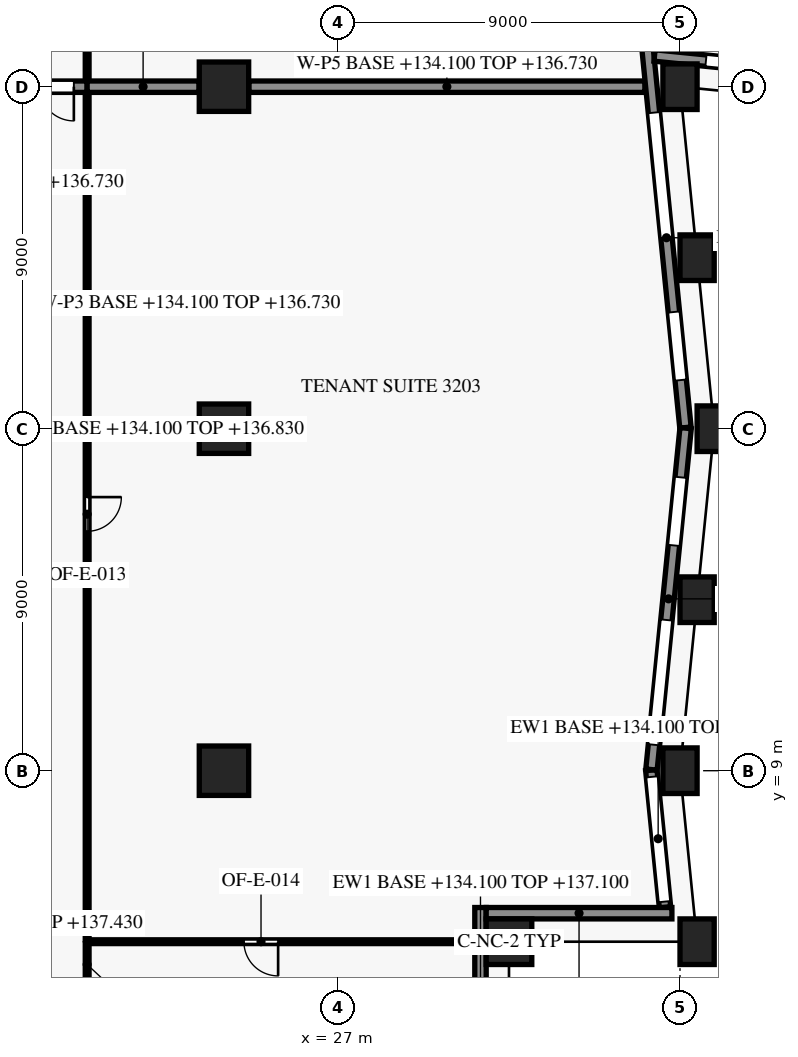
"""IFC4 building model, lengths in metres.
Left out: names, types, materials, properties, quantities, classifications, styles, units other than length and angle.
Written with IfcOpenShell. Run it as: python <this file> out.ifc"""

import sys

from ifc_helpers import new_model, si_unit, direction, frame, frame_2d, origin, origin_2d, place, context, subcontext, project, spatial, rectangle, extrude, element, fill, save


model = new_model("IFC4")
c1 = context("Model", 3, precision=1e-05, world=origin(), true_north=direction((0.0, 1.0)))
c2 = subcontext(c1, "Body", "Model", "MODEL_VIEW")
j1 = project(units=[si_unit("LENGTHUNIT", "METRE"), si_unit("PLANEANGLEUNIT", "RADIAN")], contexts=[c1])
p1 = place(None, origin())
s1 = spatial("IfcSite", under=j1, at=p1, CompositionType="ELEMENT")
p2 = place(p1, origin())
s2 = spatial("IfcBuilding", under=s1, at=p2, CompositionType="ELEMENT")
p3 = place(p2, frame((0.0, 0.0, 134.1)))
s3 = spatial("IfcBuildingStorey", under=s2, at=p3, CompositionType="ELEMENT", Elevation=134.1)
for number, where, z_axis, x_axis in (
    (1, (36.45, 4.5, 0.0), (0.0, 0.0, 1.0), (-0.1, 0.995, 0.0)),
    (2, (36.0, 9.0, 0.0), (0.0, 0.0, 1.0), (0.0, 1.0, 0.0)),
    (3, (36.45, 13.5, 0.0), (0.0, 0.0, 1.0), (0.1, 0.995, 0.0)),
    (4, (36.9, 18.0, 0.0), (0.0, 0.0, 1.0), (0.0, 1.0, 0.0)),
    (5, (36.45, 22.5, 0.0), (0.0, 0.0, 1.0), (-0.1, 0.995, 0.0)),
    (6, (36.0, 27.0, 0.0), (0.0, 0.0, 1.0), (-0.1, 0.995, 0.0)),
):
    element("IfcColumn", number, at=place(p3, frame(where, z_axis=z_axis, x_axis=x_axis)), inside=s3, PredefinedType="COLUMN", context=c2, shape_type="SweptSolid", body=[
        extrude(rectangle(XDim=0.9, YDim=1.2, at=origin_2d()), origin(), (0.0, 0.0, 1.0), 3.8),
    ])
p4 = place(p3, frame((31.5, 4.5, 0.0), z_axis=(0.0, 0.0, 1.0), x_axis=(1.0, 0.0, 0.0)))
e7 = element("IfcColumn", 7, at=p4, inside=s3, PredefinedType="COLUMN", context=c2, shape_type="SweptSolid", body=[
    extrude(rectangle(XDim=1.2, YDim=1.2, at=origin_2d()), origin(), (0.0, 0.0, 1.0), 3.8),
])
for number, where, z_axis, x_axis in (
    (8, (24.0, 9.0, 0.0), (0.0, 0.0, 1.0), (1.0, 0.0, 0.0)),
    (9, (24.0, 18.0, 0.0), (0.0, 0.0, 1.0), (1.0, 0.0, 0.0)),
    (10, (24.0, 27.0, 0.0), (0.0, 0.0, 1.0), (1.0, 0.0, 0.0)),
):
    element("IfcColumn", number, at=place(p3, frame(where, z_axis=z_axis, x_axis=x_axis)), inside=s3, PredefinedType="COLUMN", context=c2, shape_type="SweptSolid", body=[
        extrude(rectangle(XDim=1.3, YDim=1.3, at=origin_2d()), origin(), (0.0, 0.0, 1.0), 3.8),
    ])
p5 = place(p3, frame((30.75, 5.4, 0.0), z_axis=(0.0, 0.0, 1.0), x_axis=(0.0, -1.0, 0.0)))
e11 = element("IfcWall", 11, at=p5, inside=s3, PredefinedType="SOLIDWALL", context=c2, shape_type="SweptSolid", body=[
    extrude(rectangle(XDim=4.502, YDim=0.3, at=frame_2d((2.251, 0.0))), origin(), (0.0, 0.0, 1.0), 3.0),
])
p6 = place(p3, frame((35.787, 5.25, 0.0), z_axis=(0.0, 0.0, 1.0), x_axis=(-1.0, 0.0, 0.0)))
e12 = element("IfcWall", 12, at=p6, inside=s3, PredefinedType="SOLIDWALL", context=c2, shape_type="SweptSolid", body=[
    extrude(rectangle(XDim=4.887, YDim=0.3, at=frame_2d((2.444, 0.0))), origin(), (0.0, 0.0, 1.0), 3.0),
])
p7 = place(p3, frame((35.245, 9.015, 0.0), z_axis=(0.0, 0.0, 1.0), x_axis=(0.099470401798, -0.995040521369, 0.0)))
e13 = element("IfcWall", 13, at=p7, inside=s3, PredefinedType="SOLIDWALL", context=c2, shape_type="SweptSolid", body=[
    extrude(rectangle(XDim=3.628, YDim=0.3, at=frame_2d((1.814, 0.0))), origin(), (0.0, 0.0, 1.0), 3.0),
])
p8 = place(p7, frame((0.178, 0.0, 0.15)))
e14 = element("IfcOpeningElement", 14, at=p8, cuts=e13, PredefinedType="OPENING", context=c2, shape_type="SweptSolid", body=[
    extrude(rectangle(XDim=3.3, YDim=2.4, at=frame_2d((1.65, 1.2))), frame((0.0, 0.16, 0.0), z_axis=(0.0, -1.0, 0.0), x_axis=(1.0, 0.0, 0.0)), (0.0, 0.0, 1.0), 0.32),
])
p9 = place(p3, frame((36.148, 18.015, 0.0), z_axis=(0.0, 0.0, 1.0), x_axis=(-0.099495688264, -0.995037993253, 0.0)))
e15 = element("IfcWall", 15, at=p9, inside=s3, PredefinedType="SOLIDWALL", context=c2, shape_type="SweptSolid", body=[
    extrude(rectangle(XDim=9.03, YDim=0.3, at=frame_2d((4.515, 0.0))), origin(), (0.0, 0.0, 1.0), 3.0),
])
p10 = place(p9, frame((1.301, 0.0, 0.75)))
e16 = element("IfcOpeningElement", 16, at=p10, cuts=e15, PredefinedType="OPENING", context=c2, shape_type="SweptSolid", body=[
    extrude(rectangle(XDim=1.8, YDim=1.8, at=frame_2d((0.9, 0.9))), frame((0.0, 0.16, 0.0), z_axis=(0.0, -1.0, 0.0), x_axis=(1.0, 0.0, 0.0)), (0.0, 0.0, 1.0), 0.32),
])
p11 = place(p9, frame((5.073, 0.0, 0.15)))
e17 = element("IfcOpeningElement", 17, at=p11, cuts=e15, PredefinedType="OPENING", context=c2, shape_type="SweptSolid", body=[
    extrude(rectangle(XDim=3.3, YDim=2.4, at=frame_2d((1.65, 1.2))), frame((0.0, 0.16, 0.0), z_axis=(0.0, -1.0, 0.0), x_axis=(1.0, 0.0, 0.0)), (0.0, 0.0, 1.0), 0.32),
])
p12 = place(p3, frame((35.144, 28.02, 0.0), z_axis=(0.0, 0.0, 1.0), x_axis=(0.099503719021, -0.99503719021, 0.0)))
e18 = element("IfcWall", 18, at=p12, inside=s3, PredefinedType="SOLIDWALL", context=c2, shape_type="SweptSolid", body=[
    extrude(rectangle(XDim=10.04, YDim=0.3, at=frame_2d((5.02, 0.0))), origin(), (0.0, 0.0, 1.0), 3.0),
])
p13 = place(p12, frame((1.711, 0.0, 0.15)))
e19 = element("IfcOpeningElement", 19, at=p13, cuts=e18, PredefinedType="OPENING", context=c2, shape_type="SweptSolid", body=[
    extrude(rectangle(XDim=3.3, YDim=2.4, at=frame_2d((1.65, 1.2))), frame((0.0, 0.16, 0.0), z_axis=(0.0, -1.0, 0.0), x_axis=(1.0, 0.0, 0.0)), (0.0, 0.0, 1.0), 0.32),
])
p14 = place(p12, frame((6.984, 0.0, 0.75)))
e20 = element("IfcOpeningElement", 20, at=p14, cuts=e18, PredefinedType="OPENING", context=c2, shape_type="SweptSolid", body=[
    extrude(rectangle(XDim=1.8, YDim=1.8, at=frame_2d((0.9, 0.9))), frame((0.0, 0.16, 0.0), z_axis=(0.0, -1.0, 0.0), x_axis=(1.0, 0.0, 0.0)), (0.0, 0.0, 1.0), 0.32),
])
p15 = place(p3, frame((45.015, 26.852, 0.0), z_axis=(0.0, 0.0, 1.0), x_axis=(-0.995037438546, 0.099501235631, 0.0)))
e21 = element("IfcWall", 21, at=p15, inside=s3, PredefinedType="SOLIDWALL", context=c2, shape_type="SweptSolid", body=[
    extrude(rectangle(XDim=9.734, YDim=0.3, at=frame_2d((4.867, 0.0))), origin(), (0.0, 0.0, 1.0), 3.0),
])
p16 = place(p15, frame((1.301, 0.0, 0.75)))
e22 = element("IfcOpeningElement", 22, at=p16, cuts=e21, PredefinedType="OPENING", context=c2, shape_type="SweptSolid", body=[
    extrude(rectangle(XDim=1.8, YDim=1.8, at=frame_2d((0.9, 0.9))), frame((0.0, 0.16, 0.0), z_axis=(0.0, -1.0, 0.0), x_axis=(1.0, 0.0, 0.0)), (0.0, 0.0, 1.0), 0.32),
])
p17 = place(p15, frame((5.073, 0.0, 0.15)))
e23 = element("IfcOpeningElement", 23, at=p17, cuts=e21, PredefinedType="OPENING", context=c2, shape_type="SweptSolid", body=[
    extrude(rectangle(XDim=3.3, YDim=2.4, at=frame_2d((1.65, 1.2))), frame((0.0, 0.16, 0.0), z_axis=(0.0, -1.0, 0.0), x_axis=(1.0, 0.0, 0.0)), (0.0, 0.0, 1.0), 0.32),
])
p18 = place(p3, frame((20.4, 4.45, 0.0), z_axis=(0.0, 0.0, 1.0), x_axis=(0.0, -1.0, 0.0)))
e24 = element("IfcWall", 24, at=p18, inside=s3, PredefinedType="PARTITIONING", context=c2, shape_type="SweptSolid", body=[
    extrude(rectangle(XDim=1.1, YDim=0.1, at=frame_2d((0.55, 0.0))), origin(), (0.0, 0.0, 1.0), 3.33),
])
p19 = place(p3, frame((30.58, 4.5, 0.0), z_axis=(0.0, 0.0, 1.0), x_axis=(-1.0, 0.0, 0.0)))
e25 = element("IfcWall", 25, at=p19, inside=s3, PredefinedType="PARTITIONING", context=c2, shape_type="SweptSolid", body=[
    extrude(rectangle(XDim=10.13, YDim=0.1, at=frame_2d((5.065, 0.0))), origin(), (0.0, 0.0, 1.0), 2.63),
])
p20 = place(p19, frame((5.155, 0.0, 0.0)))
e26 = element("IfcOpeningElement", 26, at=p20, cuts=e25, PredefinedType="OPENING", context=c2, shape_type="SweptSolid", body=[
    extrude(rectangle(XDim=0.9, YDim=2.1, at=frame_2d((0.45, 1.05))), frame((0.0, 0.06, 0.0), z_axis=(0.0, -1.0, 0.0), x_axis=(1.0, 0.0, 0.0)), (0.0, 0.0, 1.0), 0.12),
])
p21 = place(p3, frame((20.4, 26.83, 0.0), z_axis=(0.0, 0.0, 1.0), x_axis=(0.0, -1.0, 0.0)))
e27 = element("IfcWall", 27, at=p21, inside=s3, PredefinedType="PARTITIONING", context=c2, shape_type="SweptSolid", body=[
    extrude(rectangle(XDim=22.28, YDim=0.1, at=frame_2d((11.14, 0.0))), origin(), (0.0, 0.0, 1.0), 2.63),
])
p22 = place(p21, frame((10.63, 0.0, 0.0)))
e28 = element("IfcOpeningElement", 28, at=p22, cuts=e27, PredefinedType="OPENING", context=c2, shape_type="SweptSolid", body=[
    extrude(rectangle(XDim=0.9, YDim=2.1, at=frame_2d((0.45, 1.05))), frame((0.0, 0.06, 0.0), z_axis=(0.0, -1.0, 0.0), x_axis=(1.0, 0.0, 0.0)), (0.0, 0.0, 1.0), 0.12),
])
p23 = place(p3, frame((20.4, 27.0, 0.0), z_axis=(0.0, 0.0, 1.0), x_axis=(-1.0, 0.0, 0.0)))
e29 = element("IfcWall", 29, at=p23, inside=s3, PredefinedType="PARTITIONING", context=c2, shape_type="SweptSolid", body=[
    extrude(rectangle(XDim=2.5, YDim=0.3, at=frame_2d((1.25, 0.0))), origin(), (0.0, 0.0, 1.0), 2.63),
])
p24 = place(p23, frame((0.35, 0.0, 0.0)))
e30 = element("IfcOpeningElement", 30, at=p24, cuts=e29, PredefinedType="OPENING", context=c2, shape_type="SweptSolid", body=[
    extrude(rectangle(XDim=1.8, YDim=2.1, at=frame_2d((0.9, 1.05))), frame((0.0, 0.16, 0.0), z_axis=(0.0, -1.0, 0.0), x_axis=(1.0, 0.0, 0.0)), (0.0, 0.0, 1.0), 0.32),
])
p25 = place(p3, frame((20.4, 27.0, 0.0), z_axis=(0.0, 0.0, 1.0), x_axis=(1.0, 0.0, 0.0)))
e31 = element("IfcWall", 31, at=p25, inside=s3, PredefinedType="PARTITIONING", context=c2, shape_type="SweptSolid", body=[
    extrude(rectangle(XDim=2.945, YDim=0.3, at=frame_2d((1.473, 0.0))), origin(), (0.0, 0.0, 1.0), 2.63),
])
for number, where, z_axis, x_axis in (
    (32, (24.655, 27.0, 0.0), (0.0, 0.0, 1.0), (1.0, 0.0, 0.0)),
    (33, (36.0, 27.925, 0.0), (0.0, 0.0, 1.0), (0.0, 1.0, 0.0)),
):
    element("IfcWall", number, at=place(p3, frame(where, z_axis=z_axis, x_axis=x_axis)), inside=s3, PredefinedType="PARTITIONING", context=c2, shape_type="SweptSolid", body=[
        extrude(rectangle(XDim=10.42, YDim=0.3, at=frame_2d((5.21, 0.0))), origin(), (0.0, 0.0, 1.0), 2.63),
    ])
p26 = place(p3, frame((20.4, 33.45, 0.0), z_axis=(0.0, 0.0, 1.0), x_axis=(0.0, -1.0, 0.0)))
e34 = element("IfcWall", 34, at=p26, inside=s3, PredefinedType="PARTITIONING", context=c2, shape_type="SweptSolid", body=[
    extrude(rectangle(XDim=6.28, YDim=0.1, at=frame_2d((3.14, 0.0))), origin(), (0.0, 0.0, 1.0), 2.63),
])
p27 = place(p8, origin())
e35 = element("IfcWindow", 35, at=p27, inside=s3, PartitioningType="SINGLE_PANEL", PredefinedType="WINDOW", context=c2, shape_type="SweptSolid", body=[
    extrude(rectangle(XDim=3.3, YDim=2.4, at=frame_2d((1.65, 1.2))), frame((0.0, 0.03, 0.0), z_axis=(0.0, -1.0, 0.0), x_axis=(1.0, 0.0, 0.0)), (0.0, 0.0, 1.0), 0.06),
])
fill(e14, e35)
p28 = place(p10, origin())
e36 = element("IfcWindow", 36, at=p28, inside=s3, PartitioningType="SINGLE_PANEL", PredefinedType="WINDOW", context=c2, shape_type="SweptSolid", body=[
    extrude(rectangle(XDim=1.8, YDim=1.8, at=frame_2d((0.9, 0.9))), frame((0.0, 0.03, 0.0), z_axis=(0.0, -1.0, 0.0), x_axis=(1.0, 0.0, 0.0)), (0.0, 0.0, 1.0), 0.06),
])
fill(e16, e36)
p29 = place(p11, origin())
e37 = element("IfcWindow", 37, at=p29, inside=s3, PartitioningType="SINGLE_PANEL", PredefinedType="WINDOW", context=c2, shape_type="SweptSolid", body=[
    extrude(rectangle(XDim=3.3, YDim=2.4, at=frame_2d((1.65, 1.2))), frame((0.0, 0.03, 0.0), z_axis=(0.0, -1.0, 0.0), x_axis=(1.0, 0.0, 0.0)), (0.0, 0.0, 1.0), 0.06),
])
fill(e17, e37)
p30 = place(p13, origin())
e38 = element("IfcWindow", 38, at=p30, inside=s3, PartitioningType="SINGLE_PANEL", PredefinedType="WINDOW", context=c2, shape_type="SweptSolid", body=[
    extrude(rectangle(XDim=3.3, YDim=2.4, at=frame_2d((1.65, 1.2))), frame((0.0, 0.03, 0.0), z_axis=(0.0, -1.0, 0.0), x_axis=(1.0, 0.0, 0.0)), (0.0, 0.0, 1.0), 0.06),
])
fill(e19, e38)
p31 = place(p14, origin())
e39 = element("IfcWindow", 39, at=p31, inside=s3, PartitioningType="SINGLE_PANEL", PredefinedType="WINDOW", context=c2, shape_type="SweptSolid", body=[
    extrude(rectangle(XDim=1.8, YDim=1.8, at=frame_2d((0.9, 0.9))), frame((0.0, 0.03, 0.0), z_axis=(0.0, -1.0, 0.0), x_axis=(1.0, 0.0, 0.0)), (0.0, 0.0, 1.0), 0.06),
])
fill(e20, e39)
p32 = place(p17, origin())
e40 = element("IfcWindow", 40, at=p32, inside=s3, PartitioningType="SINGLE_PANEL", PredefinedType="WINDOW", context=c2, shape_type="SweptSolid", body=[
    extrude(rectangle(XDim=3.3, YDim=2.4, at=frame_2d((1.65, 1.2))), frame((0.0, 0.03, 0.0), z_axis=(0.0, -1.0, 0.0), x_axis=(1.0, 0.0, 0.0)), (0.0, 0.0, 1.0), 0.06),
])
fill(e23, e40)
p33 = place(p22, origin())
e41 = element("IfcDoor", 41, at=p33, inside=s3, OperationType="SINGLE_SWING_LEFT", PredefinedType="DOOR", context=c2, shape_type="SweptSolid", body=[
    extrude(rectangle(XDim=0.9, YDim=2.1, at=frame_2d((0.45, 1.05))), frame((0.0, 0.025, 0.0), z_axis=(0.0, -1.0, 0.0), x_axis=(1.0, 0.0, 0.0)), (0.0, 0.0, 1.0), 0.05),
])
fill(e28, e41)
p34 = place(p20, origin())
e42 = element("IfcDoor", 42, at=p34, inside=s3, OperationType="SINGLE_SWING_LEFT", PredefinedType="DOOR", context=c2, shape_type="SweptSolid", body=[
    extrude(rectangle(XDim=0.9, YDim=2.1, at=frame_2d((0.45, 1.05))), frame((0.0, 0.025, 0.0), z_axis=(0.0, -1.0, 0.0), x_axis=(1.0, 0.0, 0.0)), (0.0, 0.0, 1.0), 0.05),
])
fill(e26, e42)
p35 = place(p24, origin())
e43 = element("IfcDoor", 43, at=p35, inside=s3, OperationType="DOUBLE_DOOR_SINGLE_SWING", PredefinedType="DOOR", context=c2, shape_type="SweptSolid", body=[
    extrude(rectangle(XDim=1.8, YDim=2.1, at=frame_2d((0.9, 1.05))), frame((0.0, 0.025, 0.0), z_axis=(0.0, -1.0, 0.0), x_axis=(1.0, 0.0, 0.0)), (0.0, 0.0, 1.0), 0.05),
])
fill(e30, e43)
save(model, sys.argv[1])
